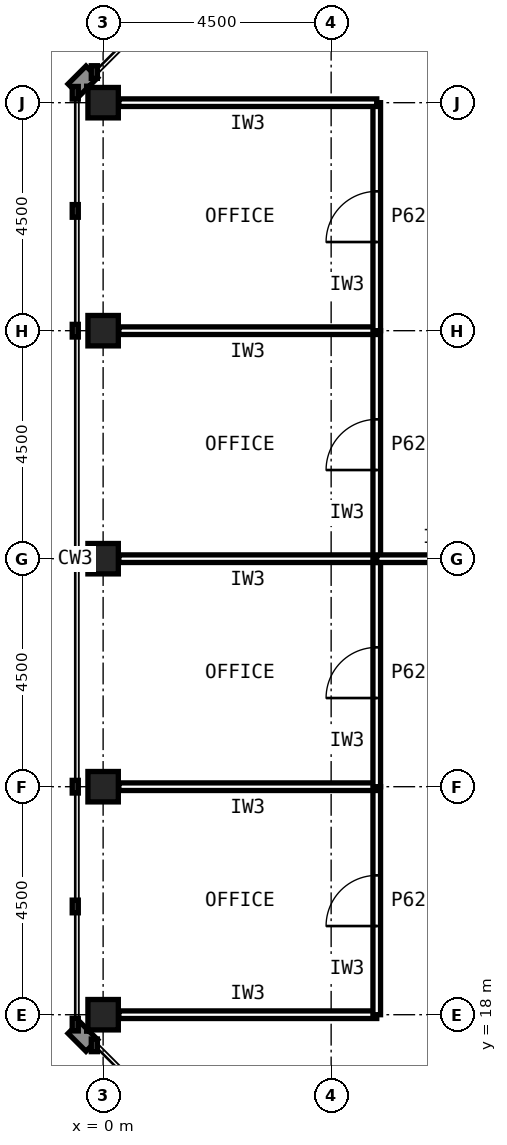
"""IFC4 building model, lengths in metres.
Left out: names, types, materials, properties, quantities, classifications, styles, units other than length and angle.
Written with IfcOpenShell. Run it as: python <this file> out.ifc"""

import sys

from ifc_helpers import new_model, si_unit, direction, frame, frame_2d, origin, origin_2d, place, context, subcontext, project, spatial, rectangle, hollow_rectangle, extrude, element, fill, save


model = new_model("IFC4")
c1 = context("Model", 3, precision=1e-05, world=origin(), true_north=direction((0.0, 1.0)))
c2 = subcontext(c1, "Body", "Model", "MODEL_VIEW")
j1 = project(units=[si_unit("LENGTHUNIT", "METRE"), si_unit("PLANEANGLEUNIT", "RADIAN")], contexts=[c1])
p1 = place(None, origin())
s1 = spatial("IfcSite", under=j1, at=p1, CompositionType="ELEMENT")
p2 = place(p1, origin())
s2 = spatial("IfcBuilding", under=s1, at=p2, CompositionType="ELEMENT")
p3 = place(p2, frame((0.0, 0.0, 262.6)))
s3 = spatial("IfcBuildingStorey", under=s2, at=p3, CompositionType="ELEMENT", Elevation=262.6)
for number, where, z_axis, x_axis in (
    (1, (0.0, 36.0, 0.0), (0.0, 0.0, 1.0), (1.0, 0.0, 0.0)),
    (2, (0.0, 31.5, 0.0), (0.0, 0.0, 1.0), (1.0, 0.0, 0.0)),
    (3, (0.0, 27.0, 0.0), (0.0, 0.0, 1.0), (1.0, 0.0, 0.0)),
    (4, (0.0, 22.5, 0.0), (0.0, 0.0, 1.0), (1.0, 0.0, 0.0)),
    (5, (0.0, 18.0, 0.0), (0.0, 0.0, 1.0), (1.0, 0.0, 0.0)),
):
    element("IfcColumn", number, at=place(p3, frame(where, z_axis=z_axis, x_axis=x_axis)), inside=s3, PredefinedType="COLUMN", context=c2, shape_type="SweptSolid", body=[
        extrude(hollow_rectangle(XDim=0.6, YDim=0.6, WallThickness=0.028, at=origin_2d()), origin(), (0.0, 0.0, 1.0), 4.0),
    ])
p4 = place(p3, frame((0.31, 18.0, 0.0), z_axis=(0.0, 0.0, 1.0), x_axis=(1.0, 0.0, 0.0)))
e6 = element("IfcWall", 6, at=p4, inside=s3, PredefinedType="PARTITIONING", context=c2, shape_type="SweptSolid", body=[
    extrude(rectangle(XDim=5.09, YDim=0.15, at=frame_2d((2.545, 0.0))), origin(), (0.0, 0.0, 1.0), 2.989),
])
p5 = place(p3, frame((5.4, 18.0, 0.0), z_axis=(0.0, 0.0, 1.0), x_axis=(0.0, 1.0, 0.0)))
e7 = element("IfcWall", 7, at=p5, inside=s3, PredefinedType="PARTITIONING", context=c2, shape_type="SweptSolid", body=[
    extrude(rectangle(XDim=4.5, YDim=0.15, at=frame_2d((2.25, 0.0))), origin(), (0.0, 0.0, 1.0), 3.84),
])
p6 = place(p5, frame((1.75, 0.0, 0.0)))
e8 = element("IfcOpeningElement", 8, at=p6, cuts=e7, PredefinedType="OPENING", context=c2, shape_type="SweptSolid", body=[
    extrude(rectangle(XDim=1.0, YDim=2.1, at=frame_2d((0.5, 1.05))), frame((0.0, 0.085, 0.0), z_axis=(0.0, -1.0, 0.0), x_axis=(1.0, 0.0, 0.0)), (0.0, 0.0, 1.0), 0.17),
])
p7 = place(p3, frame((5.4, 22.5, 0.0), z_axis=(0.0, 0.0, 1.0), x_axis=(-1.0, 0.0, 0.0)))
e9 = element("IfcWall", 9, at=p7, inside=s3, PredefinedType="PARTITIONING", context=c2, shape_type="SweptSolid", body=[
    extrude(rectangle(XDim=5.09, YDim=0.15, at=frame_2d((2.545, 0.0))), origin(), (0.0, 0.0, 1.0), 2.989),
])
p8 = place(p3, frame((5.4, 22.5, 0.0), z_axis=(0.0, 0.0, 1.0), x_axis=(0.0, 1.0, 0.0)))
e10 = element("IfcWall", 10, at=p8, inside=s3, PredefinedType="PARTITIONING", context=c2, shape_type="SweptSolid", body=[
    extrude(rectangle(XDim=4.5, YDim=0.15, at=frame_2d((2.25, 0.0))), origin(), (0.0, 0.0, 1.0), 3.84),
])
p9 = place(p8, frame((1.75, 0.0, 0.0)))
e11 = element("IfcOpeningElement", 11, at=p9, cuts=e10, PredefinedType="OPENING", context=c2, shape_type="SweptSolid", body=[
    extrude(rectangle(XDim=1.0, YDim=2.1, at=frame_2d((0.5, 1.05))), frame((0.0, 0.085, 0.0), z_axis=(0.0, -1.0, 0.0), x_axis=(1.0, 0.0, 0.0)), (0.0, 0.0, 1.0), 0.17),
])
p10 = place(p3, frame((5.4, 27.0, 0.0), z_axis=(0.0, 0.0, 1.0), x_axis=(-1.0, 0.0, 0.0)))
e12 = element("IfcWall", 12, at=p10, inside=s3, PredefinedType="PARTITIONING", context=c2, shape_type="SweptSolid", body=[
    extrude(rectangle(XDim=5.09, YDim=0.15, at=frame_2d((2.545, 0.0))), origin(), (0.0, 0.0, 1.0), 2.989),
])
p11 = place(p3, frame((5.4, 27.0, 0.0), z_axis=(0.0, 0.0, 1.0), x_axis=(0.0, 1.0, 0.0)))
e13 = element("IfcWall", 13, at=p11, inside=s3, PredefinedType="PARTITIONING", context=c2, shape_type="SweptSolid", body=[
    extrude(rectangle(XDim=4.5, YDim=0.15, at=frame_2d((2.25, 0.0))), origin(), (0.0, 0.0, 1.0), 3.84),
])
p12 = place(p11, frame((1.75, 0.0, 0.0)))
e14 = element("IfcOpeningElement", 14, at=p12, cuts=e13, PredefinedType="OPENING", context=c2, shape_type="SweptSolid", body=[
    extrude(rectangle(XDim=1.0, YDim=2.1, at=frame_2d((0.5, 1.05))), frame((0.0, 0.085, 0.0), z_axis=(0.0, -1.0, 0.0), x_axis=(1.0, 0.0, 0.0)), (0.0, 0.0, 1.0), 0.17),
])
p13 = place(p3, frame((5.4, 31.5, 0.0), z_axis=(0.0, 0.0, 1.0), x_axis=(-1.0, 0.0, 0.0)))
e15 = element("IfcWall", 15, at=p13, inside=s3, PredefinedType="PARTITIONING", context=c2, shape_type="SweptSolid", body=[
    extrude(rectangle(XDim=5.09, YDim=0.15, at=frame_2d((2.545, 0.0))), origin(), (0.0, 0.0, 1.0), 2.989),
])
p14 = place(p3, frame((5.4, 31.5, 0.0), z_axis=(0.0, 0.0, 1.0), x_axis=(0.0, 1.0, 0.0)))
e16 = element("IfcWall", 16, at=p14, inside=s3, PredefinedType="PARTITIONING", context=c2, shape_type="SweptSolid", body=[
    extrude(rectangle(XDim=4.5, YDim=0.15, at=frame_2d((2.25, 0.0))), origin(), (0.0, 0.0, 1.0), 3.84),
])
p15 = place(p14, frame((1.75, 0.0, 0.0)))
e17 = element("IfcOpeningElement", 17, at=p15, cuts=e16, PredefinedType="OPENING", context=c2, shape_type="SweptSolid", body=[
    extrude(rectangle(XDim=1.0, YDim=2.1, at=frame_2d((0.5, 1.05))), frame((0.0, 0.085, 0.0), z_axis=(0.0, -1.0, 0.0), x_axis=(1.0, 0.0, 0.0)), (0.0, 0.0, 1.0), 0.17),
])
p16 = place(p3, frame((5.4, 36.0, 0.0), z_axis=(0.0, 0.0, 1.0), x_axis=(-1.0, 0.0, 0.0)))
e18 = element("IfcWall", 18, at=p16, inside=s3, PredefinedType="PARTITIONING", context=c2, shape_type="SweptSolid", body=[
    extrude(rectangle(XDim=5.09, YDim=0.15, at=frame_2d((2.545, 0.0))), origin(), (0.0, 0.0, 1.0), 2.989),
])
p17 = place(p3, frame((5.4, 27.0, 0.0), z_axis=(0.0, 0.0, 1.0), x_axis=(1.0, 0.0, 0.0)))
e19 = element("IfcWall", 19, at=p17, inside=s3, PredefinedType="PARTITIONING", context=c2, shape_type="SweptSolid", body=[
    extrude(rectangle(XDim=6.3, YDim=0.15, at=frame_2d((3.15, 0.0))), origin(), (0.0, 0.0, 1.0), 2.989),
])
p18 = place(p17, frame((2.65, 0.0, 0.0)))
e20 = element("IfcOpeningElement", 20, at=p18, cuts=e19, PredefinedType="OPENING", context=c2, shape_type="SweptSolid", body=[
    extrude(rectangle(XDim=1.0, YDim=2.1, at=frame_2d((0.5, 1.05))), frame((0.0, 0.085, 0.0), z_axis=(0.0, -1.0, 0.0), x_axis=(1.0, 0.0, 0.0)), (0.0, 0.0, 1.0), 0.17),
])
p19 = place(p6, origin())
e21 = element("IfcDoor", 21, at=p19, inside=s3, OperationType="SINGLE_SWING_LEFT", PredefinedType="DOOR", context=c2, shape_type="SweptSolid", body=[
    extrude(rectangle(XDim=1.0, YDim=2.1, at=frame_2d((0.5, 1.05))), frame((0.0, 0.025, 0.0), z_axis=(0.0, -1.0, 0.0), x_axis=(1.0, 0.0, 0.0)), (0.0, 0.0, 1.0), 0.05),
])
fill(e8, e21)
p20 = place(p9, origin())
e22 = element("IfcDoor", 22, at=p20, inside=s3, OperationType="SINGLE_SWING_LEFT", PredefinedType="DOOR", context=c2, shape_type="SweptSolid", body=[
    extrude(rectangle(XDim=1.0, YDim=2.1, at=frame_2d((0.5, 1.05))), frame((0.0, 0.025, 0.0), z_axis=(0.0, -1.0, 0.0), x_axis=(1.0, 0.0, 0.0)), (0.0, 0.0, 1.0), 0.05),
])
fill(e11, e22)
p21 = place(p12, origin())
e23 = element("IfcDoor", 23, at=p21, inside=s3, OperationType="SINGLE_SWING_LEFT", PredefinedType="DOOR", context=c2, shape_type="SweptSolid", body=[
    extrude(rectangle(XDim=1.0, YDim=2.1, at=frame_2d((0.5, 1.05))), frame((0.0, 0.025, 0.0), z_axis=(0.0, -1.0, 0.0), x_axis=(1.0, 0.0, 0.0)), (0.0, 0.0, 1.0), 0.05),
])
fill(e14, e23)
p22 = place(p15, origin())
e24 = element("IfcDoor", 24, at=p22, inside=s3, OperationType="SINGLE_SWING_LEFT", PredefinedType="DOOR", context=c2, shape_type="SweptSolid", body=[
    extrude(rectangle(XDim=1.0, YDim=2.1, at=frame_2d((0.5, 1.05))), frame((0.0, 0.025, 0.0), z_axis=(0.0, -1.0, 0.0), x_axis=(1.0, 0.0, 0.0)), (0.0, 0.0, 1.0), 0.05),
])
fill(e17, e24)
save(model, sys.argv[1])
